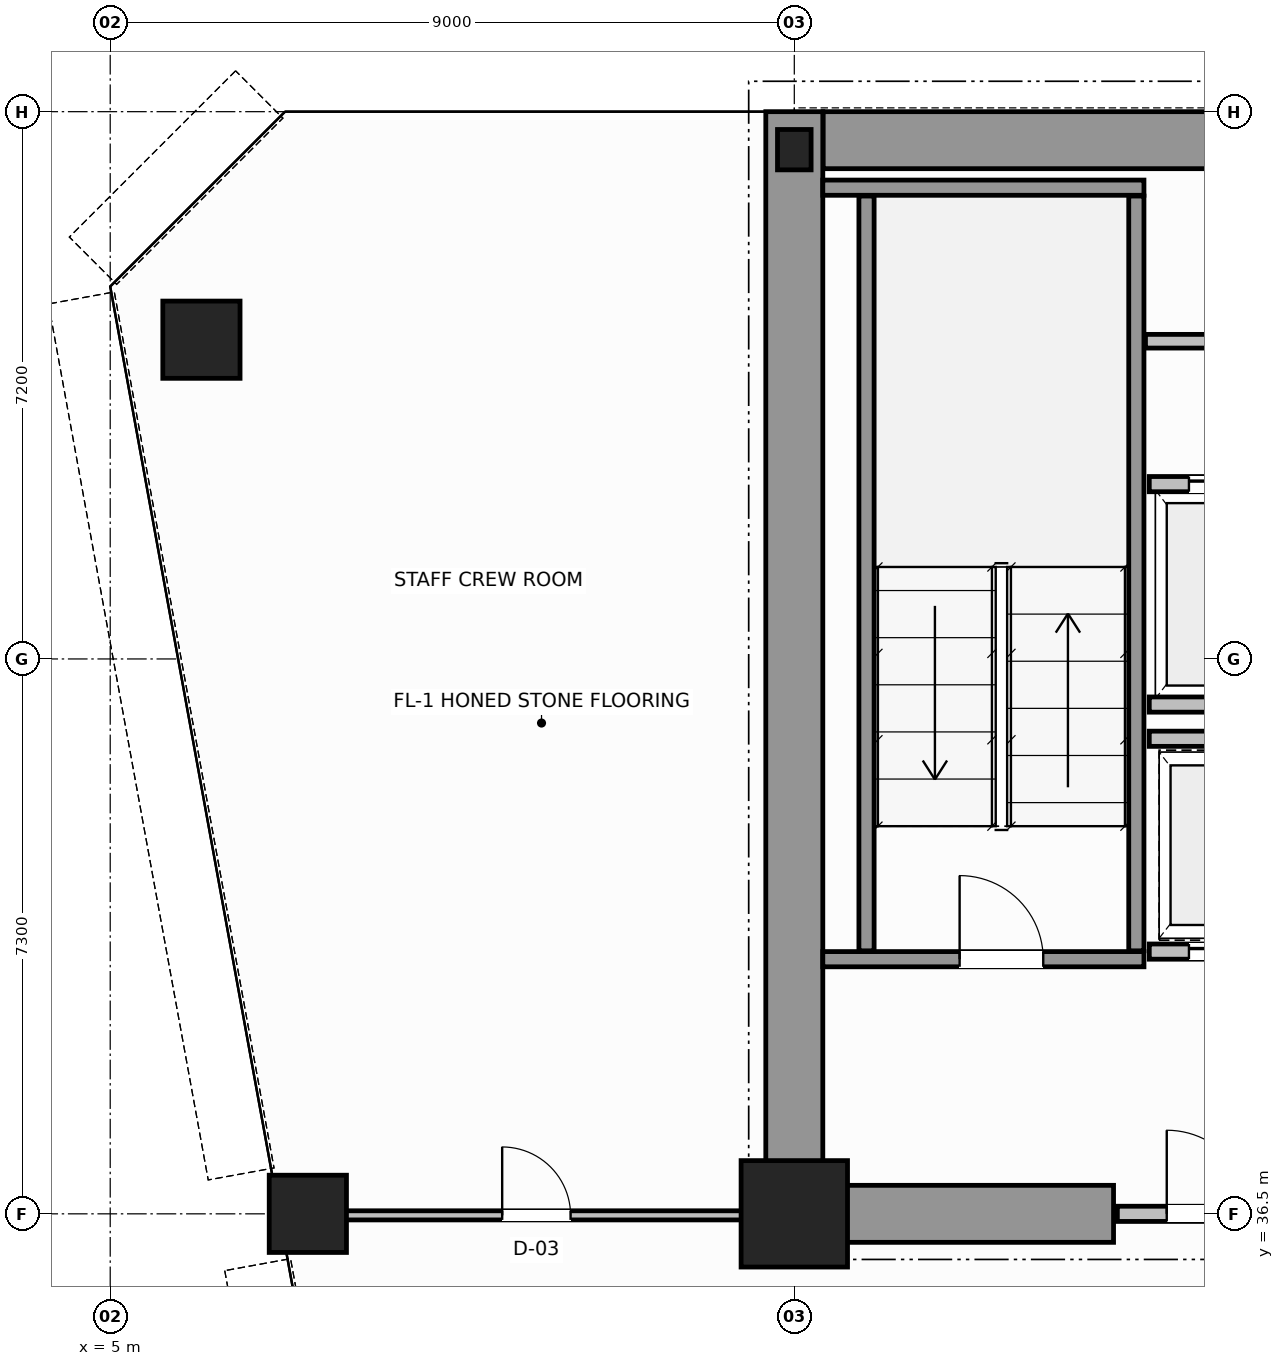
"""IFC4 building model, lengths in metres.
Left out: names, types, materials, properties, quantities, classifications, styles, units other than length and angle.
Written with IfcOpenShell. Run it as: python <this file> out.ifc"""

import sys

from ifc_helpers import new_model, si_unit, direction, frame, frame_2d, origin, origin_2d, place, context, subcontext, project, spatial, rectangle, hollow_circle, i_section, extrude, source, transform, mapped, element, fill, save


model = new_model("IFC4")
c1 = context("Model", 3, precision=1e-05, world=origin(), true_north=direction((0.0, 1.0)))
c2 = subcontext(c1, "Body", "Model", "MODEL_VIEW")
j1 = project(units=[si_unit("LENGTHUNIT", "METRE"), si_unit("PLANEANGLEUNIT", "RADIAN")], contexts=[c1])
p1 = place(None, origin())
s1 = spatial("IfcSite", under=j1, at=p1, CompositionType="ELEMENT")
p2 = place(p1, origin())
s2 = spatial("IfcBuilding", under=s1, at=p2, CompositionType="ELEMENT")
p3 = place(p2, frame((0.0, 0.0, 103.4)))
s3 = spatial("IfcBuildingStorey", under=s2, at=p3, CompositionType="ELEMENT", Elevation=103.4)
m1 = source(origin(), c2, "Body", "SweptSolid", [
    extrude(rectangle(XDim=1.4, YDim=1.4, at=origin_2d()), origin(), (0.0, 0.0, 1.0), 3.8),
])
p4 = place(p3, frame((14.0, 36.5, 0.0), z_axis=(0.0, 0.0, 1.0), x_axis=(1.0, 0.0, 0.0)))
e1 = element("IfcColumn", 1, at=p4, inside=s3, PredefinedType="COLUMN", context=c2, shape_type="MappedRepresentation", body=[
    mapped(m1, transform((0.0, 0.0, 0.0), scale=1.0)),
])
m2 = source(origin(), c2, "Body", "SweptSolid", [
    extrude(i_section(OverallWidth=0.442, OverallDepth=0.531, WebThickness=0.065, FlangeThickness=0.076, FilletRadius=0.015, at=origin_2d()), origin(), (0.0, 0.0, 1.0), 3.8),
])
p5 = place(p3, frame((14.0, 50.5, 0.0), z_axis=(0.0, 0.0, 1.0), x_axis=(1.0, 0.0, 0.0)))
e2 = element("IfcColumn", 2, at=p5, inside=s3, PredefinedType="COLUMN", context=c2, shape_type="MappedRepresentation", body=[
    mapped(m2, transform((0.0, 0.0, 0.0), scale=1.0)),
])
m3 = source(origin(), c2, "Body", "SweptSolid", [
    extrude(hollow_circle(Radius=0.508, WallThickness=0.045, at=origin_2d()), origin(), (0.0, 0.0, 1.0), 3.8),
])
for number, where, z_axis, x_axis in (
    (3, (6.2, 48.0, 0.0), (0.0, 0.0, 1.0), (1.0, 0.0, 0.0)),
    (4, (7.6, 36.5, 0.0), (0.0, 0.0, 1.0), (1.0, 0.0, 0.0)),
):
    element("IfcColumn", number, at=place(p3, frame(where, z_axis=z_axis, x_axis=x_axis)), inside=s3, PredefinedType="COLUMN", context=c2, shape_type="MappedRepresentation", body=[
        mapped(m3, transform((0.0, 0.0, 0.0), scale=1.0)),
    ])
p6 = place(p3, frame((14.379, 50.625, 0.0), z_axis=(0.0, 0.0, 1.0), x_axis=(1.0, 0.0, 0.0)))
e5 = element("IfcWall", 5, at=p6, inside=s3, PredefinedType="SHEAR", context=c2, shape_type="SweptSolid", body=[
    extrude(rectangle(XDim=19.619, YDim=0.75, at=frame_2d((9.81, 0.0))), origin(), (0.0, 0.0, 1.0), 3.8),
])
p7 = place(p3, frame((14.0, 36.5, 0.0), z_axis=(0.0, 0.0, 1.0), x_axis=(0.0, 1.0, 0.0)))
e6 = element("IfcWall", 6, at=p7, inside=s3, PredefinedType="SHEAR", context=c2, shape_type="SweptSolid", body=[
    extrude(rectangle(XDim=14.5, YDim=0.75, at=frame_2d((7.25, 0.0))), origin(), (0.0, 0.0, 1.0), 3.8),
])
p8 = place(p3, frame((14.395, 36.5, 0.0), z_axis=(0.0, 0.0, 1.0), x_axis=(1.0, 0.0, 0.0)))
e7 = element("IfcWall", 7, at=p8, inside=s3, PredefinedType="SHEAR", context=c2, shape_type="SweptSolid", body=[
    extrude(rectangle(XDim=3.805, YDim=0.75, at=frame_2d((1.902, 0.0))), origin(), (0.0, 0.0, 1.0), 2.38),
])
p9 = place(p3, frame((14.375, 39.85, 0.0), z_axis=(0.0, 0.0, 1.0), x_axis=(1.0, 0.0, 0.0)))
e8 = element("IfcWall", 8, at=p9, inside=s3, PredefinedType="SOLIDWALL", context=c2, shape_type="SweptSolid", body=[
    extrude(rectangle(XDim=4.225, YDim=0.2, at=frame_2d((2.113, 0.0))), origin(), (0.0, 0.0, 1.0), 3.8),
])
p10 = place(p9, frame((1.8, 0.0, 0.0)))
e9 = element("IfcOpeningElement", 9, at=p10, cuts=e8, PredefinedType="OPENING", context=c2, shape_type="SweptSolid", body=[
    extrude(rectangle(XDim=1.1, YDim=2.15, at=frame_2d((0.55, 1.075))), frame((0.0, 0.11, 0.0), z_axis=(0.0, -1.0, 0.0), x_axis=(1.0, 0.0, 0.0)), (0.0, 0.0, 1.0), 0.22),
])
p11 = place(p3, frame((14.375, 50.0, 0.0), z_axis=(0.0, 0.0, 1.0), x_axis=(1.0, 0.0, 0.0)))
e10 = element("IfcWall", 10, at=p11, inside=s3, PredefinedType="SOLIDWALL", context=c2, shape_type="SweptSolid", body=[
    extrude(rectangle(XDim=4.225, YDim=0.2, at=frame_2d((2.113, 0.0))), origin(), (0.0, 0.0, 1.0), 3.8),
])
for number, where, z_axis, x_axis in (
    (11, (14.95, 39.96, 0.0), (0.0, 0.0, 1.0), (0.0, 1.0, 0.0)),
    (12, (18.5, 39.96, 0.0), (0.0, 0.0, 1.0), (0.0, 1.0, 0.0)),
):
    element("IfcWall", number, at=place(p3, frame(where, z_axis=z_axis, x_axis=x_axis)), inside=s3, PredefinedType="SOLIDWALL", context=c2, shape_type="SweptSolid", body=[
        extrude(rectangle(XDim=9.93, YDim=0.2, at=frame_2d((4.965, 0.0))), origin(), (0.0, 0.0, 1.0), 3.8),
    ])
p12 = place(p3, frame((18.25, 36.5, 0.0), z_axis=(0.0, 0.0, 1.0), x_axis=(1.0, 0.0, 0.0)))
e13 = element("IfcWall", 13, at=p12, inside=s3, PredefinedType="SOLIDWALL", context=c2, shape_type="SweptSolid", body=[
    extrude(rectangle(XDim=2.47, YDim=0.2, at=frame_2d((1.235, 0.0))), origin(), (0.0, 0.0, 1.0), 2.37),
])
p13 = place(p12, frame((0.65, 0.0, 0.0)))
e14 = element("IfcOpeningElement", 14, at=p13, cuts=e13, PredefinedType="OPENING", context=c2, shape_type="SweptSolid", body=[
    extrude(rectangle(XDim=1.1, YDim=2.15, at=frame_2d((0.55, 1.075))), frame((0.0, 0.11, 0.0), z_axis=(0.0, -1.0, 0.0), x_axis=(1.0, 0.0, 0.0)), (0.0, 0.0, 1.0), 0.22),
])
p14 = place(p3, frame((18.67, 46.1, 0.0), z_axis=(0.0, 0.0, 1.0), x_axis=(1.0, 0.0, 0.0)))
e15 = element("IfcWall", 15, at=p14, inside=s3, PredefinedType="SOLIDWALL", context=c2, shape_type="SweptSolid", body=[
    extrude(rectangle(XDim=2.145, YDim=0.2, at=frame_2d((1.073, 0.0))), origin(), (0.0, 0.0, 1.0), 3.58),
])
p15 = place(p14, frame((0.522, 0.0, 0.0)))
e16 = element("IfcOpeningElement", 16, at=p15, cuts=e15, PredefinedType="OPENING", context=c2, shape_type="SweptSolid", body=[
    extrude(rectangle(XDim=1.1, YDim=2.15, at=frame_2d((0.55, 1.075))), frame((0.0, 0.11, 0.0), z_axis=(0.0, -1.0, 0.0), x_axis=(1.0, 0.0, 0.0)), (0.0, 0.0, 1.0), 0.22),
])
p16 = place(p3, frame((18.67, 43.2, 0.0), z_axis=(0.0, 0.0, 1.0), x_axis=(1.0, 0.0, 0.0)))
e17 = element("IfcWall", 17, at=p16, inside=s3, PredefinedType="SOLIDWALL", context=c2, shape_type="SweptSolid", body=[
    extrude(rectangle(XDim=2.145, YDim=0.2, at=frame_2d((1.073, 0.0))), origin(), (0.0, 0.0, 1.0), 3.58),
])
p17 = place(p3, frame((18.67, 39.95, 0.0), z_axis=(0.0, 0.0, 1.0), x_axis=(1.0, 0.0, 0.0)))
e18 = element("IfcWall", 18, at=p17, inside=s3, PredefinedType="SOLIDWALL", context=c2, shape_type="SweptSolid", body=[
    extrude(rectangle(XDim=2.145, YDim=0.2, at=frame_2d((1.073, 0.0))), origin(), (0.0, 0.0, 1.0), 3.58),
])
p18 = place(p17, frame((0.522, 0.0, 0.0)))
e19 = element("IfcOpeningElement", 19, at=p18, cuts=e18, PredefinedType="OPENING", context=c2, shape_type="SweptSolid", body=[
    extrude(rectangle(XDim=1.1, YDim=2.15, at=frame_2d((0.55, 1.075))), frame((0.0, 0.11, 0.0), z_axis=(0.0, -1.0, 0.0), x_axis=(1.0, 0.0, 0.0)), (0.0, 0.0, 1.0), 0.22),
])
p19 = place(p3, frame((18.67, 42.75, 0.0), z_axis=(0.0, 0.0, 1.0), x_axis=(1.0, 0.0, 0.0)))
e20 = element("IfcWall", 20, at=p19, inside=s3, PredefinedType="SOLIDWALL", context=c2, shape_type="SweptSolid", body=[
    extrude(rectangle(XDim=2.145, YDim=0.2, at=frame_2d((1.073, 0.0))), origin(), (0.0, 0.0, 1.0), 3.58),
])
p20 = place(p3, frame((18.62, 47.98, 0.0), z_axis=(0.0, 0.0, 1.0), x_axis=(1.0, 0.0, 0.0)))
e21 = element("IfcWall", 21, at=p20, inside=s3, PredefinedType="PLUMBINGWALL", context=c2, shape_type="SweptSolid", body=[
    extrude(rectangle(XDim=20.06, YDim=0.18, at=frame_2d((10.03, 0.0))), origin(), (0.0, 0.0, 1.0), 3.58),
])
p21 = place(p20, frame((3.5, 0.0, 0.0)))
e22 = element("IfcOpeningElement", 22, at=p21, cuts=e21, PredefinedType="OPENING", context=c2, shape_type="SweptSolid", body=[
    extrude(rectangle(XDim=0.9, YDim=2.15, at=frame_2d((0.45, 1.075))), frame((0.0, 0.1, 0.0), z_axis=(0.0, -1.0, 0.0), x_axis=(1.0, 0.0, 0.0)), (0.0, 0.0, 1.0), 0.2),
])
p22 = place(p20, frame((10.8, 0.0, 0.0)))
e23 = element("IfcOpeningElement", 23, at=p22, cuts=e21, PredefinedType="OPENING", context=c2, shape_type="SweptSolid", body=[
    extrude(rectangle(XDim=0.9, YDim=2.15, at=frame_2d((0.45, 1.075))), frame((0.0, 0.1, 0.0), z_axis=(0.0, -1.0, 0.0), x_axis=(1.0, 0.0, 0.0)), (0.0, 0.0, 1.0), 0.2),
])
p23 = place(p20, frame((16.8, 0.0, 0.0)))
e24 = element("IfcOpeningElement", 24, at=p23, cuts=e21, PredefinedType="OPENING", context=c2, shape_type="SweptSolid", body=[
    extrude(rectangle(XDim=0.9, YDim=2.15, at=frame_2d((0.45, 1.075))), frame((0.0, 0.1, 0.0), z_axis=(0.0, -1.0, 0.0), x_axis=(1.0, 0.0, 0.0)), (0.0, 0.0, 1.0), 0.2),
])
p24 = place(p3, frame((7.274, 36.48, 0.0), z_axis=(0.0, 0.0, 1.0), x_axis=(1.0, 0.0, 0.0)))
e25 = element("IfcWall", 25, at=p24, inside=s3, PredefinedType="PARTITIONING", context=c2, shape_type="SweptSolid", body=[
    extrude(rectangle(XDim=6.666, YDim=0.12, at=frame_2d((3.333, 0.0))), origin(), (0.0, 0.0, 1.0), 2.87),
])
p25 = place(p24, frame((2.883, 0.0, 0.0)))
e26 = element("IfcOpeningElement", 26, at=p25, cuts=e25, PredefinedType="OPENING", context=c2, shape_type="SweptSolid", body=[
    extrude(rectangle(XDim=0.9, YDim=2.15, at=frame_2d((0.45, 1.075))), frame((0.0, 0.07, 0.0), z_axis=(0.0, -1.0, 0.0), x_axis=(1.0, 0.0, 0.0)), (0.0, 0.0, 1.0), 0.14),
])
m4 = source(origin(), c2, "Body", "SweptSolid", [
    extrude(rectangle(XDim=1.1, YDim=2.15, at=frame_2d((0.55, 1.075))), frame((0.0, 0.025, 0.0), z_axis=(0.0, -1.0, 0.0), x_axis=(1.0, 0.0, 0.0)), (0.0, 0.0, 1.0), 0.05),
])
p26 = place(p10, origin())
e27 = element("IfcDoor", 27, at=p26, inside=s3, OperationType="SINGLE_SWING_LEFT", PredefinedType="DOOR", context=c2, shape_type="MappedRepresentation", body=[
    mapped(m4, transform((0.0, 0.0, 0.0), scale=1.0)),
])
fill(e9, e27)
p27 = place(p13, origin())
e28 = element("IfcDoor", 28, at=p27, inside=s3, OperationType="SINGLE_SWING_RIGHT", PredefinedType="DOOR", context=c2, shape_type="MappedRepresentation", body=[
    mapped(m4, transform((0.0, 0.0, 0.0), scale=1.0)),
])
fill(e14, e28)
p28 = place(p15, origin())
e29 = element("IfcDoor", 29, at=p28, inside=s3, OperationType="DOUBLE_DOOR_SLIDING", PredefinedType="DOOR", context=c2, shape_type="MappedRepresentation", body=[
    mapped(m4, transform((0.0, 0.0, 0.0), scale=1.0)),
])
fill(e16, e29)
p29 = place(p18, origin())
e30 = element("IfcDoor", 30, at=p29, inside=s3, OperationType="DOUBLE_DOOR_SLIDING", PredefinedType="DOOR", context=c2, shape_type="MappedRepresentation", body=[
    mapped(m4, transform((0.0, 0.0, 0.0), scale=1.0)),
])
fill(e19, e30)
m5 = source(origin(), c2, "Body", "SweptSolid", [
    extrude(rectangle(XDim=0.9, YDim=2.15, at=frame_2d((0.45, 1.075))), frame((0.0, 0.025, 0.0), z_axis=(0.0, -1.0, 0.0), x_axis=(1.0, 0.0, 0.0)), (0.0, 0.0, 1.0), 0.05),
])
p30 = place(p25, origin())
e31 = element("IfcDoor", 31, at=p30, inside=s3, OperationType="SINGLE_SWING_LEFT", PredefinedType="DOOR", context=c2, shape_type="MappedRepresentation", body=[
    mapped(m5, transform((0.0, 0.0, 0.0), scale=1.0)),
])
fill(e26, e31)
save(model, sys.argv[1])
